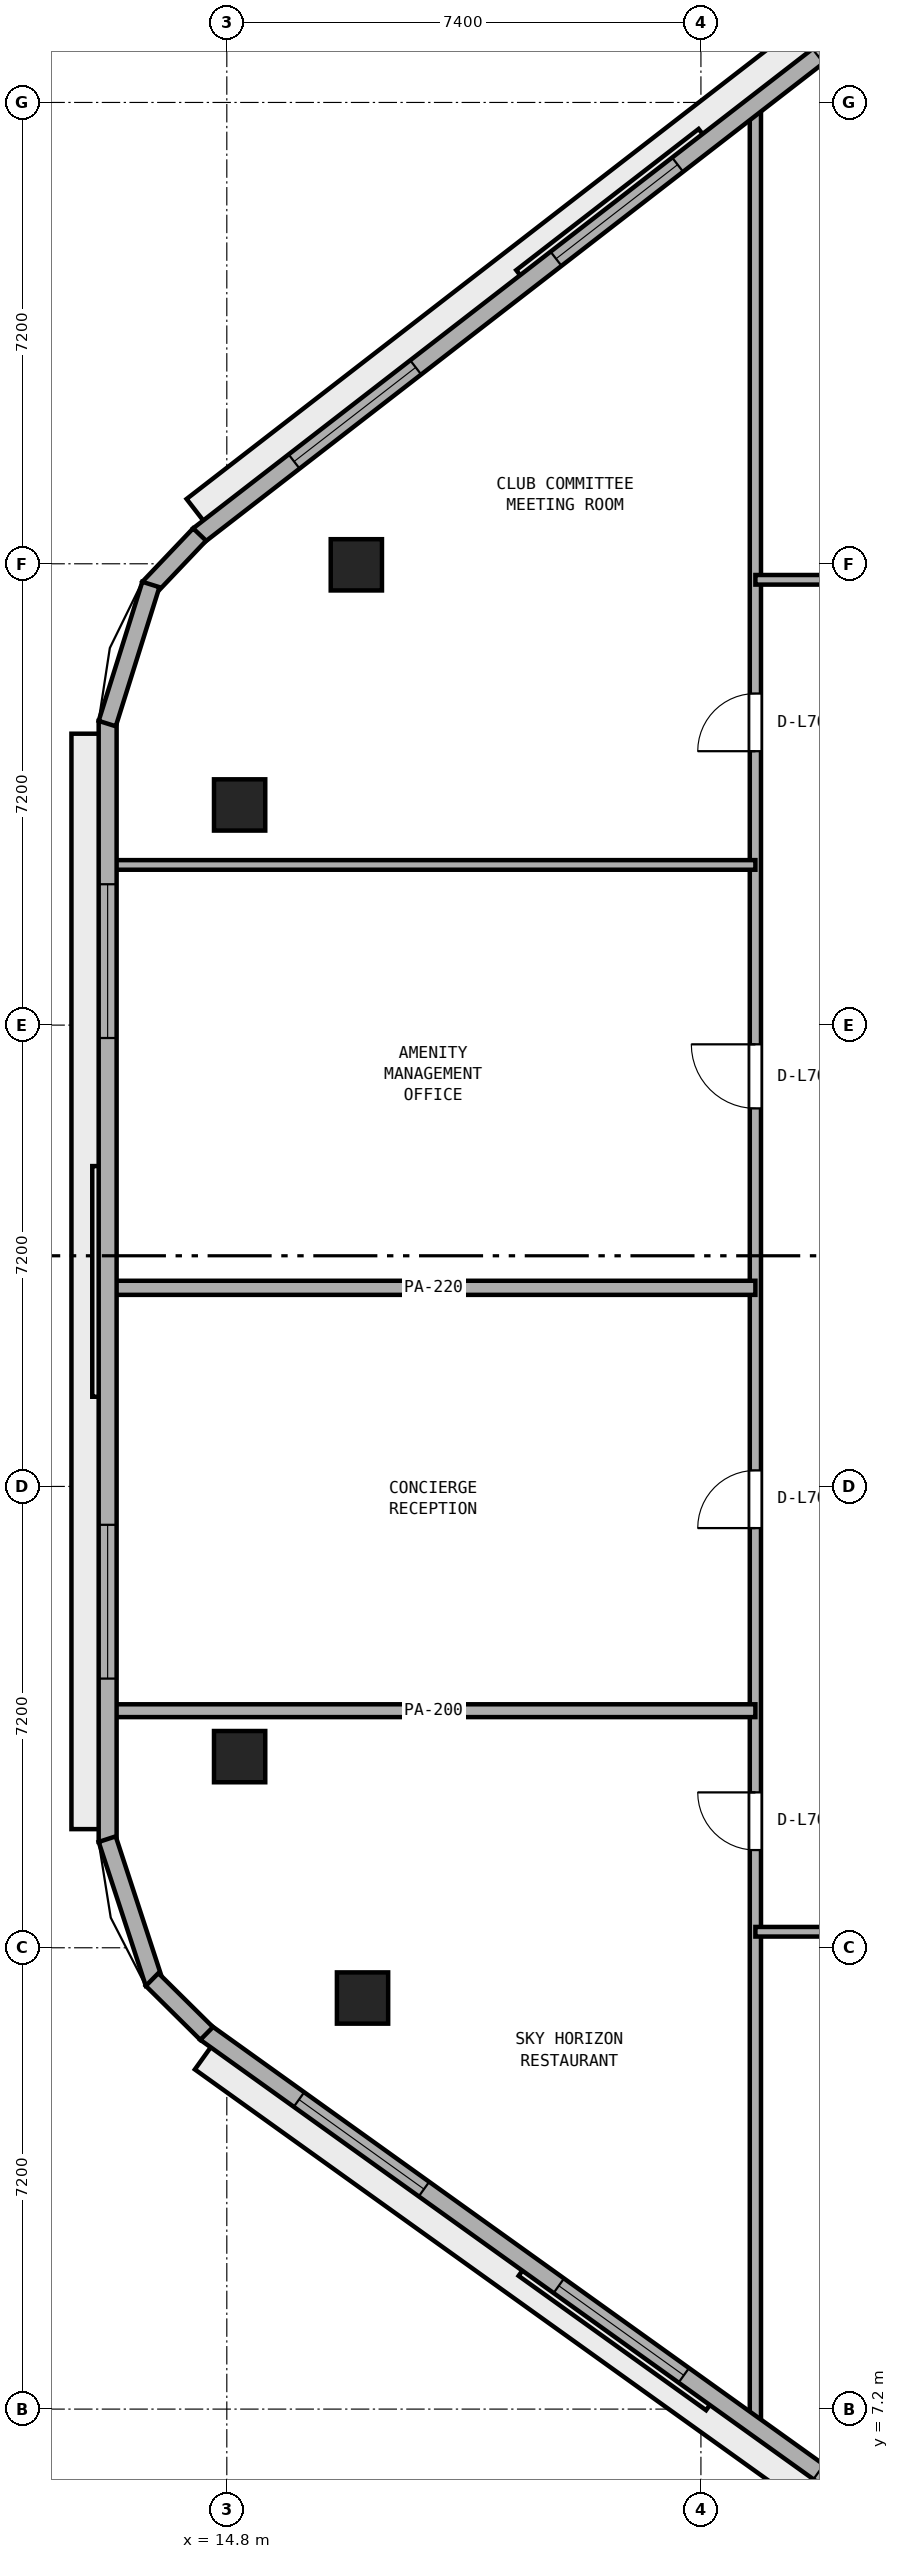
"""IFC4 building model, lengths in metres.
Left out: names, types, materials, properties, quantities, classifications, styles, units other than length and angle.
Written with IfcOpenShell. Run it as: python <this file> out.ifc"""

import sys

from ifc_helpers import new_model, si_unit, direction, frame, frame_2d, origin, origin_2d, place, context, subcontext, project, spatial, rectangle, extrude, element, fill, save


model = new_model("IFC4")
c1 = context("Model", 3, precision=1e-05, world=origin(), true_north=direction((0.0, 1.0)))
c2 = subcontext(c1, "Body", "Model", "MODEL_VIEW")
j1 = project(units=[si_unit("LENGTHUNIT", "METRE"), si_unit("PLANEANGLEUNIT", "RADIAN")], contexts=[c1])
p1 = place(None, origin())
s1 = spatial("IfcSite", under=j1, at=p1, CompositionType="ELEMENT")
p2 = place(p1, origin())
s2 = spatial("IfcBuilding", under=s1, at=p2, CompositionType="ELEMENT")
p3 = place(p2, frame((0.0, 0.0, 274.4)))
s3 = spatial("IfcBuildingStorey", under=s2, at=p3, CompositionType="ELEMENT", Elevation=274.4)
for number, where, z_axis, x_axis in (
    (1, (16.822, 35.984, 0.0), (0.0, 0.0, 1.0), (1.0, 0.0, 0.0)),
    (2, (15.0, 32.236, 0.0), (0.0, 0.0, 1.0), (1.0, 0.0, 0.0)),
    (3, (15.0, 17.383, 0.0), (0.0, 0.0, 1.0), (1.0, 0.0, 0.0)),
    (4, (16.918, 13.616, 0.0), (0.0, 0.0, 1.0), (1.0, 0.0, 0.0)),
):
    element("IfcColumn", number, at=place(p3, frame(where, z_axis=z_axis, x_axis=x_axis)), inside=s3, PredefinedType="COLUMN", context=c2, shape_type="SweptSolid", body=[
        extrude(rectangle(XDim=0.8, YDim=0.8, at=origin_2d()), origin(), (0.0, 0.0, 1.0), 3.8),
    ])
p4 = place(p3, frame((23.05, 6.894, 0.0), z_axis=(0.0, 0.0, 1.0), x_axis=(0.0, 1.0, 0.0)))
e5 = element("IfcWall", 5, at=p4, inside=s3, PredefinedType="PARTITIONING", context=c2, shape_type="SweptSolid", body=[
    extrude(rectangle(XDim=36.312, YDim=0.175, at=frame_2d((18.156, 0.0))), origin(), (0.0, 0.0, 1.0), 3.54),
])
p5 = place(p4, frame((9.031, 0.0, 0.0)))
e6 = element("IfcOpeningElement", 6, at=p5, cuts=e5, PredefinedType="OPENING", context=c2, shape_type="SweptSolid", body=[
    extrude(rectangle(XDim=0.9, YDim=2.1, at=frame_2d((0.45, 1.05))), frame((0.0, 0.097, 0.0), z_axis=(0.0, -1.0, 0.0), x_axis=(1.0, 0.0, 0.0)), (0.0, 0.0, 1.0), 0.195),
])
p6 = place(p4, frame((14.056, 0.0, 0.0)))
e7 = element("IfcOpeningElement", 7, at=p6, cuts=e5, PredefinedType="OPENING", context=c2, shape_type="SweptSolid", body=[
    extrude(rectangle(XDim=0.9, YDim=2.1, at=frame_2d((0.45, 1.05))), frame((0.0, 0.097, 0.0), z_axis=(0.0, -1.0, 0.0), x_axis=(1.0, 0.0, 0.0)), (0.0, 0.0, 1.0), 0.195),
])
p7 = place(p4, frame((20.606, 0.0, 0.0)))
e8 = element("IfcOpeningElement", 8, at=p7, cuts=e5, PredefinedType="OPENING", context=c2, shape_type="SweptSolid", body=[
    extrude(rectangle(XDim=1.0, YDim=2.12, at=frame_2d((0.5, 1.06))), frame((0.0, 0.097, 0.0), z_axis=(0.0, -1.0, 0.0), x_axis=(1.0, 0.0, 0.0)), (0.0, 0.0, 1.0), 0.195),
])
p8 = place(p4, frame((26.181, 0.0, 0.0)))
e9 = element("IfcOpeningElement", 9, at=p8, cuts=e5, PredefinedType="OPENING", context=c2, shape_type="SweptSolid", body=[
    extrude(rectangle(XDim=0.9, YDim=2.1, at=frame_2d((0.45, 1.05))), frame((0.0, 0.097, 0.0), z_axis=(0.0, -1.0, 0.0), x_axis=(1.0, 0.0, 0.0)), (0.0, 0.0, 1.0), 0.195),
])
p9 = place(p3, frame((23.05, 14.65, 0.0), z_axis=(0.0, 0.0, 1.0), x_axis=(1.0, 0.0, 0.0)))
e10 = element("IfcWall", 10, at=p9, inside=s3, PredefinedType="PARTITIONING", context=c2, shape_type="SweptSolid", body=[
    extrude(rectangle(XDim=12.6, YDim=0.15, at=frame_2d((6.3, 0.0))), origin(), (0.0, 0.0, 1.0), 3.54),
])
p10 = place(p9, frame((2.645, 0.0, 0.0)))
e11 = element("IfcOpeningElement", 11, at=p10, cuts=e10, PredefinedType="OPENING", context=c2, shape_type="SweptSolid", body=[
    extrude(rectangle(XDim=0.9, YDim=2.1, at=frame_2d((0.45, 1.05))), frame((0.0, 0.085, 0.0), z_axis=(0.0, -1.0, 0.0), x_axis=(1.0, 0.0, 0.0)), (0.0, 0.0, 1.0), 0.17),
])
p11 = place(p3, frame((13.005, 18.1, 0.0), z_axis=(0.0, 0.0, 1.0), x_axis=(1.0, 0.0, 0.0)))
e12 = element("IfcWall", 12, at=p11, inside=s3, PredefinedType="PARTITIONING", context=c2, shape_type="SweptSolid", body=[
    extrude(rectangle(XDim=10.045, YDim=0.2, at=frame_2d((5.022, 0.0))), origin(), (0.0, 0.0, 1.0), 3.54),
])
p12 = place(p3, frame((13.005, 24.7, 0.0), z_axis=(0.0, 0.0, 1.0), x_axis=(1.0, 0.0, 0.0)))
e13 = element("IfcWall", 13, at=p12, inside=s3, PredefinedType="PARTITIONING", context=c2, shape_type="SweptSolid", body=[
    extrude(rectangle(XDim=10.045, YDim=0.22, at=frame_2d((5.022, 0.0))), origin(), (0.0, 0.0, 1.0), 3.54),
])
p13 = place(p3, frame((13.005, 31.3, 0.0), z_axis=(0.0, 0.0, 1.0), x_axis=(1.0, 0.0, 0.0)))
e14 = element("IfcWall", 14, at=p13, inside=s3, PredefinedType="PARTITIONING", context=c2, shape_type="SweptSolid", body=[
    extrude(rectangle(XDim=10.045, YDim=0.15, at=frame_2d((5.022, 0.0))), origin(), (0.0, 0.0, 1.0), 3.54),
])
p14 = place(p3, frame((23.05, 35.75, 0.0), z_axis=(0.0, 0.0, 1.0), x_axis=(1.0, 0.0, 0.0)))
e15 = element("IfcWall", 15, at=p14, inside=s3, PredefinedType="PARTITIONING", context=c2, shape_type="SweptSolid", body=[
    extrude(rectangle(XDim=25.55, YDim=0.15, at=frame_2d((12.775, 0.0))), origin(), (0.0, 0.0, 1.0), 3.54),
])
p15 = place(p14, frame((6.345, 0.0, 0.0)))
e16 = element("IfcOpeningElement", 16, at=p15, cuts=e15, PredefinedType="OPENING", context=c2, shape_type="SweptSolid", body=[
    extrude(rectangle(XDim=1.0, YDim=2.12, at=frame_2d((0.5, 1.06))), frame((0.0, 0.085, 0.0), z_axis=(0.0, -1.0, 0.0), x_axis=(1.0, 0.0, 0.0)), (0.0, 0.0, 1.0), 0.17),
])
p16 = place(p14, frame((18.93, 0.0, 0.0)))
e17 = element("IfcOpeningElement", 17, at=p16, cuts=e15, PredefinedType="OPENING", context=c2, shape_type="SweptSolid", body=[
    extrude(rectangle(XDim=0.9, YDim=2.1, at=frame_2d((0.45, 1.05))), frame((0.0, 0.085, 0.0), z_axis=(0.0, -1.0, 0.0), x_axis=(1.0, 0.0, 0.0)), (0.0, 0.0, 1.0), 0.17),
])
p17 = place(p3, frame((27.415, 46.547, 0.0), z_axis=(0.0, 0.0, 1.0), x_axis=(-0.790789745248, -0.612087884875, 0.0)))
e18 = element("IfcWall", 18, at=p17, inside=s3, PredefinedType="STANDARD", context=c2, shape_type="SweptSolid", body=[
    extrude(rectangle(XDim=16.509, YDim=0.28, at=frame_2d((8.254, 0.0))), origin(), (0.0, 0.0, 1.0), 3.54),
])
p18 = place(p17, frame((1.885, 0.0, 0.9)))
e19 = element("IfcOpeningElement", 19, at=p18, cuts=e18, PredefinedType="OPENING", context=c2, shape_type="SweptSolid", body=[
    extrude(rectangle(XDim=2.4, YDim=1.75, at=frame_2d((1.2, 0.875))), frame((0.0, 0.15, 0.0), z_axis=(0.0, -1.0, 0.0), x_axis=(1.0, 0.0, 0.0)), (0.0, 0.0, 1.0), 0.3),
])
p19 = place(p17, frame((7.055, 0.0, 0.9)))
e20 = element("IfcOpeningElement", 20, at=p19, cuts=e18, PredefinedType="OPENING", context=c2, shape_type="SweptSolid", body=[
    extrude(rectangle(XDim=2.4, YDim=1.75, at=frame_2d((1.2, 0.875))), frame((0.0, 0.15, 0.0), z_axis=(0.0, -1.0, 0.0), x_axis=(1.0, 0.0, 0.0)), (0.0, 0.0, 1.0), 0.3),
])
p20 = place(p17, frame((12.224, 0.0, 0.9)))
e21 = element("IfcOpeningElement", 21, at=p20, cuts=e18, PredefinedType="OPENING", context=c2, shape_type="SweptSolid", body=[
    extrude(rectangle(XDim=2.4, YDim=1.75, at=frame_2d((1.2, 0.875))), frame((0.0, 0.15, 0.0), z_axis=(0.0, -1.0, 0.0), x_axis=(1.0, 0.0, 0.0)), (0.0, 0.0, 1.0), 0.3),
])
p21 = place(p3, frame((12.94, 33.548, 0.0), z_axis=(0.0, 0.0, 1.0), x_axis=(0.0, -1.0, 0.0)))
e22 = element("IfcWall", 22, at=p21, inside=s3, PredefinedType="STANDARD", context=c2, shape_type="SweptSolid", body=[
    extrude(rectangle(XDim=17.496, YDim=0.28, at=frame_2d((8.748, 0.0))), origin(), (0.0, 0.0, 1.0), 3.54),
])
p22 = place(p21, frame((2.549, 0.0, 0.9)))
e23 = element("IfcOpeningElement", 23, at=p22, cuts=e22, PredefinedType="OPENING", context=c2, shape_type="SweptSolid", body=[
    extrude(rectangle(XDim=2.4, YDim=1.75, at=frame_2d((1.2, 0.875))), frame((0.0, 0.15, 0.0), z_axis=(0.0, -1.0, 0.0), x_axis=(1.0, 0.0, 0.0)), (0.0, 0.0, 1.0), 0.3),
])
p23 = place(p21, frame((12.547, 0.0, 0.9)))
e24 = element("IfcOpeningElement", 24, at=p23, cuts=e22, PredefinedType="OPENING", context=c2, shape_type="SweptSolid", body=[
    extrude(rectangle(XDim=2.4, YDim=1.75, at=frame_2d((1.2, 0.875))), frame((0.0, 0.15, 0.0), z_axis=(0.0, -1.0, 0.0), x_axis=(1.0, 0.0, 0.0)), (0.0, 0.0, 1.0), 0.3),
])
p24 = place(p3, frame((14.468, 13.077, 0.0), z_axis=(0.0, 0.0, 1.0), x_axis=(0.812809888039, -0.582529042972, 0.0)))
e25 = element("IfcWall", 25, at=p24, inside=s3, PredefinedType="STANDARD", context=c2, shape_type="SweptSolid", body=[
    extrude(rectangle(XDim=15.968, YDim=0.28, at=frame_2d((7.984, 0.0))), origin(), (0.0, 0.0, 1.0), 3.54),
])
p25 = place(p24, frame((1.795, 0.0, 0.9)))
e26 = element("IfcOpeningElement", 26, at=p25, cuts=e25, PredefinedType="OPENING", context=c2, shape_type="SweptSolid", body=[
    extrude(rectangle(XDim=2.4, YDim=1.75, at=frame_2d((1.2, 0.875))), frame((0.0, 0.15, 0.0), z_axis=(0.0, -1.0, 0.0), x_axis=(1.0, 0.0, 0.0)), (0.0, 0.0, 1.0), 0.3),
])
p26 = place(p24, frame((6.784, 0.0, 0.9)))
e27 = element("IfcOpeningElement", 27, at=p26, cuts=e25, PredefinedType="OPENING", context=c2, shape_type="SweptSolid", body=[
    extrude(rectangle(XDim=2.4, YDim=1.75, at=frame_2d((1.2, 0.875))), frame((0.0, 0.15, 0.0), z_axis=(0.0, -1.0, 0.0), x_axis=(1.0, 0.0, 0.0)), (0.0, 0.0, 1.0), 0.3),
])
p27 = place(p24, frame((11.773, 0.0, 0.9)))
e28 = element("IfcOpeningElement", 28, at=p27, cuts=e25, PredefinedType="OPENING", context=c2, shape_type="SweptSolid", body=[
    extrude(rectangle(XDim=2.4, YDim=1.75, at=frame_2d((1.2, 0.875))), frame((0.0, 0.15, 0.0), z_axis=(0.0, -1.0, 0.0), x_axis=(1.0, 0.0, 0.0)), (0.0, 0.0, 1.0), 0.3),
])
p28 = place(p3, frame((14.375, 36.457, 0.0), z_axis=(0.0, 0.0, 1.0), x_axis=(-0.68895569752, -0.724803453948, 0.0)))
e29 = element("IfcWall", 29, at=p28, inside=s3, PredefinedType="STANDARD", context=c2, shape_type="SweptSolid", body=[
    extrude(rectangle(XDim=1.151, YDim=0.28, at=frame_2d((0.575, 0.0))), origin(), (0.0, 0.0, 1.0), 3.54),
])
p29 = place(p3, frame((13.615, 35.677, 0.0), z_axis=(0.0, 0.0, 1.0), x_axis=(-0.299374552426, -0.954135670311, 0.0)))
e30 = element("IfcWall", 30, at=p29, inside=s3, PredefinedType="STANDARD", context=c2, shape_type="SweptSolid", body=[
    extrude(rectangle(XDim=2.275, YDim=0.28, at=frame_2d((1.138, 0.0))), origin(), (0.0, 0.0, 1.0), 3.54),
])
p30 = place(p3, frame((12.933, 16.095, 0.0), z_axis=(0.0, 0.0, 1.0), x_axis=(0.3110492363, -0.950393798695, 0.0)))
e31 = element("IfcWall", 31, at=p30, inside=s3, PredefinedType="STANDARD", context=c2, shape_type="SweptSolid", body=[
    extrude(rectangle(XDim=2.364, YDim=0.28, at=frame_2d((1.182, 0.0))), origin(), (0.0, 0.0, 1.0), 3.54),
])
p31 = place(p3, frame((13.634, 13.904, 0.0), z_axis=(0.0, 0.0, 1.0), x_axis=(0.710971221429, -0.703221104845, 0.0)))
e32 = element("IfcWall", 32, at=p31, inside=s3, PredefinedType="STANDARD", context=c2, shape_type="SweptSolid", body=[
    extrude(rectangle(XDim=1.197, YDim=0.28, at=frame_2d((0.599, 0.0))), origin(), (0.0, 0.0, 1.0), 3.54),
])
p32 = place(p5, origin())
e33 = element("IfcDoor", 33, at=p32, inside=s3, OperationType="SINGLE_SWING_RIGHT", PredefinedType="DOOR", context=c2, shape_type="SweptSolid", body=[
    extrude(rectangle(XDim=0.9, YDim=2.1, at=frame_2d((0.45, 1.05))), frame((0.0, 0.025, 0.0), z_axis=(0.0, -1.0, 0.0), x_axis=(1.0, 0.0, 0.0)), (0.0, 0.0, 1.0), 0.05),
])
fill(e6, e33)
p33 = place(p6, origin())
e34 = element("IfcDoor", 34, at=p33, inside=s3, OperationType="SINGLE_SWING_LEFT", PredefinedType="DOOR", context=c2, shape_type="SweptSolid", body=[
    extrude(rectangle(XDim=0.9, YDim=2.1, at=frame_2d((0.45, 1.05))), frame((0.0, 0.025, 0.0), z_axis=(0.0, -1.0, 0.0), x_axis=(1.0, 0.0, 0.0)), (0.0, 0.0, 1.0), 0.05),
])
fill(e7, e34)
p34 = place(p7, origin())
e35 = element("IfcDoor", 35, at=p34, inside=s3, OperationType="SINGLE_SWING_RIGHT", PredefinedType="DOOR", context=c2, shape_type="SweptSolid", body=[
    extrude(rectangle(XDim=1.0, YDim=2.12, at=frame_2d((0.5, 1.06))), frame((0.0, 0.025, 0.0), z_axis=(0.0, -1.0, 0.0), x_axis=(1.0, 0.0, 0.0)), (0.0, 0.0, 1.0), 0.05),
])
fill(e8, e35)
p35 = place(p8, origin())
e36 = element("IfcDoor", 36, at=p35, inside=s3, OperationType="SINGLE_SWING_LEFT", PredefinedType="DOOR", context=c2, shape_type="SweptSolid", body=[
    extrude(rectangle(XDim=0.9, YDim=2.1, at=frame_2d((0.45, 1.05))), frame((0.0, 0.025, 0.0), z_axis=(0.0, -1.0, 0.0), x_axis=(1.0, 0.0, 0.0)), (0.0, 0.0, 1.0), 0.05),
])
fill(e9, e36)
p36 = place(p18, origin())
e37 = element("IfcWindow", 37, at=p36, inside=s3, PartitioningType="SINGLE_PANEL", PredefinedType="WINDOW", context=c2, shape_type="SweptSolid", body=[
    extrude(rectangle(XDim=2.4, YDim=1.75, at=frame_2d((1.2, 0.875))), frame((0.0, 0.03, 0.0), z_axis=(0.0, -1.0, 0.0), x_axis=(1.0, 0.0, 0.0)), (0.0, 0.0, 1.0), 0.06),
])
fill(e19, e37)
p37 = place(p19, origin())
e38 = element("IfcWindow", 38, at=p37, inside=s3, PartitioningType="SINGLE_PANEL", PredefinedType="WINDOW", context=c2, shape_type="SweptSolid", body=[
    extrude(rectangle(XDim=2.4, YDim=1.75, at=frame_2d((1.2, 0.875))), frame((0.0, 0.03, 0.0), z_axis=(0.0, -1.0, 0.0), x_axis=(1.0, 0.0, 0.0)), (0.0, 0.0, 1.0), 0.06),
])
fill(e20, e38)
p38 = place(p20, origin())
e39 = element("IfcWindow", 39, at=p38, inside=s3, PartitioningType="SINGLE_PANEL", PredefinedType="WINDOW", context=c2, shape_type="SweptSolid", body=[
    extrude(rectangle(XDim=2.4, YDim=1.75, at=frame_2d((1.2, 0.875))), frame((0.0, 0.03, 0.0), z_axis=(0.0, -1.0, 0.0), x_axis=(1.0, 0.0, 0.0)), (0.0, 0.0, 1.0), 0.06),
])
fill(e21, e39)
p39 = place(p22, origin())
e40 = element("IfcWindow", 40, at=p39, inside=s3, PartitioningType="SINGLE_PANEL", PredefinedType="WINDOW", context=c2, shape_type="SweptSolid", body=[
    extrude(rectangle(XDim=2.4, YDim=1.75, at=frame_2d((1.2, 0.875))), frame((0.0, 0.03, 0.0), z_axis=(0.0, -1.0, 0.0), x_axis=(1.0, 0.0, 0.0)), (0.0, 0.0, 1.0), 0.06),
])
fill(e23, e40)
p40 = place(p23, origin())
e41 = element("IfcWindow", 41, at=p40, inside=s3, PartitioningType="SINGLE_PANEL", PredefinedType="WINDOW", context=c2, shape_type="SweptSolid", body=[
    extrude(rectangle(XDim=2.4, YDim=1.75, at=frame_2d((1.2, 0.875))), frame((0.0, 0.03, 0.0), z_axis=(0.0, -1.0, 0.0), x_axis=(1.0, 0.0, 0.0)), (0.0, 0.0, 1.0), 0.06),
])
fill(e24, e41)
p41 = place(p25, origin())
e42 = element("IfcWindow", 42, at=p41, inside=s3, PartitioningType="SINGLE_PANEL", PredefinedType="WINDOW", context=c2, shape_type="SweptSolid", body=[
    extrude(rectangle(XDim=2.4, YDim=1.75, at=frame_2d((1.2, 0.875))), frame((0.0, 0.03, 0.0), z_axis=(0.0, -1.0, 0.0), x_axis=(1.0, 0.0, 0.0)), (0.0, 0.0, 1.0), 0.06),
])
fill(e26, e42)
p42 = place(p26, origin())
e43 = element("IfcWindow", 43, at=p42, inside=s3, PartitioningType="SINGLE_PANEL", PredefinedType="WINDOW", context=c2, shape_type="SweptSolid", body=[
    extrude(rectangle(XDim=2.4, YDim=1.75, at=frame_2d((1.2, 0.875))), frame((0.0, 0.03, 0.0), z_axis=(0.0, -1.0, 0.0), x_axis=(1.0, 0.0, 0.0)), (0.0, 0.0, 1.0), 0.06),
])
fill(e27, e43)
p43 = place(p27, origin())
e44 = element("IfcWindow", 44, at=p43, inside=s3, PartitioningType="SINGLE_PANEL", PredefinedType="WINDOW", context=c2, shape_type="SweptSolid", body=[
    extrude(rectangle(XDim=2.4, YDim=1.75, at=frame_2d((1.2, 0.875))), frame((0.0, 0.03, 0.0), z_axis=(0.0, -1.0, 0.0), x_axis=(1.0, 0.0, 0.0)), (0.0, 0.0, 1.0), 0.06),
])
fill(e28, e44)
save(model, sys.argv[1])
